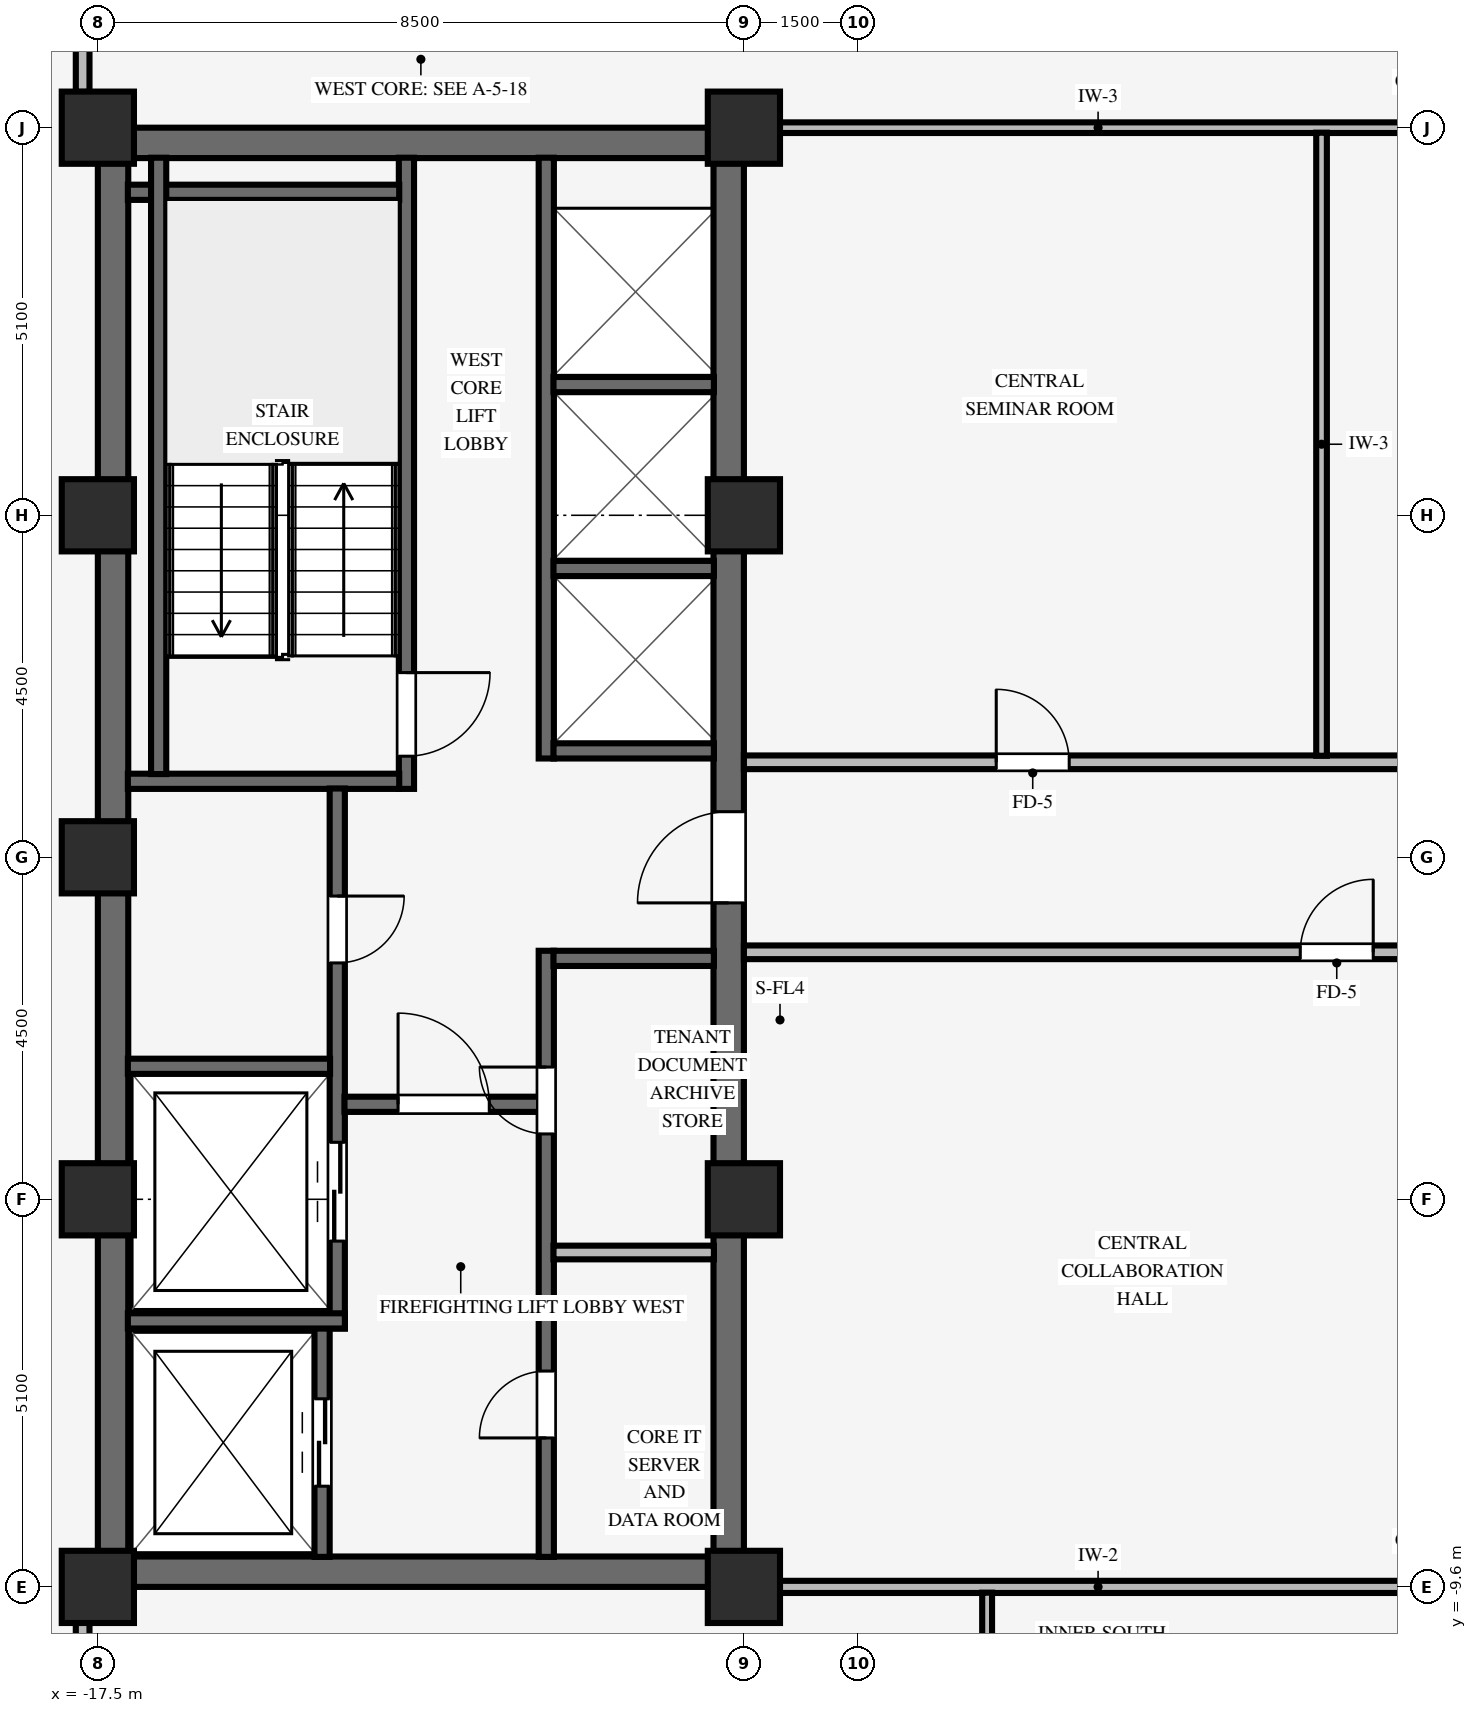
"""IFC4 building model, lengths in metres.
Left out: names, types, materials, properties, quantities, classifications, styles, units other than length and angle.
Written with IfcOpenShell. Run it as: python <this file> out.ifc"""

import sys

from ifc_helpers import new_model, si_unit, direction, frame, frame_2d, origin, origin_2d, place, context, subcontext, project, spatial, rectangle, extrude, source, transform, mapped, element, fill, save


model = new_model("IFC4")
c1 = context("Model", 3, precision=1e-05, world=origin(), true_north=direction((0.0, 1.0)))
c2 = subcontext(c1, "Body", "Model", "MODEL_VIEW")
j1 = project(units=[si_unit("LENGTHUNIT", "METRE"), si_unit("PLANEANGLEUNIT", "RADIAN")], contexts=[c1])
p1 = place(None, origin())
s1 = spatial("IfcSite", under=j1, at=p1, CompositionType="ELEMENT")
p2 = place(p1, origin())
s2 = spatial("IfcBuilding", under=s1, at=p2, CompositionType="ELEMENT")
p3 = place(p2, frame((0.0, 0.0, 178.6)))
s3 = spatial("IfcBuildingStorey", under=s2, at=p3, CompositionType="ELEMENT", Elevation=178.6)
for number, where, z_axis, x_axis in (
    (1, (-17.5, -9.4, 0.0), (0.0, 0.0, 1.0), (1.0, 0.0, 0.0)),
    (2, (-17.5, 9.4, 0.0), (0.0, 0.0, 1.0), (1.0, 0.0, 0.0)),
):
    element("IfcWall", number, at=place(p3, frame(where, z_axis=z_axis, x_axis=x_axis)), inside=s3, PredefinedType="SHEAR", context=c2, shape_type="SweptSolid", body=[
        extrude(rectangle(XDim=8.5, YDim=0.4, at=frame_2d((4.25, 0.0))), origin(), (0.0, 0.0, 1.0), 3.37),
    ])
p4 = place(p3, frame((-17.3, -9.205, 0.0), z_axis=(0.0, 0.0, 1.0), x_axis=(0.0, 1.0, 0.0)))
e3 = element("IfcWall", 3, at=p4, inside=s3, PredefinedType="SHEAR", context=c2, shape_type="SweptSolid", body=[
    extrude(rectangle(XDim=18.41, YDim=0.4, at=frame_2d((9.205, 0.0))), origin(), (0.0, 0.0, 1.0), 3.37),
])
p5 = place(p3, frame((-9.2, -9.205, 0.0), z_axis=(0.0, 0.0, 1.0), x_axis=(0.0, 1.0, 0.0)))
e4 = element("IfcWall", 4, at=p5, inside=s3, PredefinedType="SHEAR", context=c2, shape_type="SweptSolid", body=[
    extrude(rectangle(XDim=18.41, YDim=0.4, at=frame_2d((9.205, 0.0))), origin(), (0.0, 0.0, 1.0), 3.37),
])
p6 = place(p5, frame((8.605, 0.0, 0.0)))
e5 = element("IfcOpeningElement", 5, at=p6, cuts=e4, PredefinedType="OPENING", context=c2, shape_type="SweptSolid", body=[
    extrude(rectangle(XDim=1.2, YDim=2.15, at=frame_2d((0.6, 1.075))), frame((0.0, 0.21, 0.0), z_axis=(0.0, -1.0, 0.0), x_axis=(1.0, 0.0, 0.0)), (0.0, 0.0, 1.0), 0.42),
])
for number, where, z_axis, x_axis in (
    (6, (-17.5, -9.6, 0.0), (0.0, 0.0, 1.0), (1.0, 0.0, 0.0)),
    (7, (-17.5, -4.5, 0.0), (0.0, 0.0, 1.0), (1.0, 0.0, 0.0)),
    (8, (-17.5, 4.5, 0.0), (0.0, 0.0, 1.0), (1.0, 0.0, 0.0)),
    (9, (-17.5, 9.6, 0.0), (0.0, 0.0, 1.0), (1.0, 0.0, 0.0)),
    (10, (-9.0, -9.6, 0.0), (0.0, 0.0, 1.0), (1.0, 0.0, 0.0)),
    (11, (-9.0, -4.5, 0.0), (0.0, 0.0, 1.0), (1.0, 0.0, 0.0)),
    (12, (-9.0, 4.5, 0.0), (0.0, 0.0, 1.0), (1.0, 0.0, 0.0)),
    (13, (-9.0, 9.6, 0.0), (0.0, 0.0, 1.0), (1.0, 0.0, 0.0)),
    (14, (-17.5, 0.0, 0.0), (0.0, 0.0, 1.0), (1.0, 0.0, 0.0)),
):
    element("IfcColumn", number, at=place(p3, frame(where, z_axis=z_axis, x_axis=x_axis)), inside=s3, PredefinedType="COLUMN", context=c2, shape_type="SweptSolid", body=[
        extrude(rectangle(XDim=0.95, YDim=0.95, at=origin_2d()), origin(), (0.0, 0.0, 1.0), 3.37),
    ])
p7 = place(p3, frame((-13.44, 0.9, 0.0), z_axis=(0.0, 0.0, 1.0), x_axis=(0.0, 1.0, 0.0)))
e15 = element("IfcWall", 15, at=p7, inside=s3, PredefinedType="SHEAR", context=c2, shape_type="SweptSolid", body=[
    extrude(rectangle(XDim=8.305, YDim=0.2, at=frame_2d((4.153, 0.0))), origin(), (0.0, 0.0, 1.0), 3.37),
])
p8 = place(p7, frame((1.53, 0.0, 0.0), z_axis=(0.0, 0.0, 1.0), x_axis=(-1.0, 0.0, 0.0)))
e16 = element("IfcOpeningElement", 16, at=p8, cuts=e15, PredefinedType="OPENING", context=c2, shape_type="SweptSolid", body=[
    extrude(rectangle(XDim=1.1, YDim=2.15, at=frame_2d((0.55, 1.075))), frame((0.0, 0.11, 0.0), z_axis=(0.0, -1.0, 0.0), x_axis=(1.0, 0.0, 0.0)), (0.0, 0.0, 1.0), 0.22),
])
for number, where, z_axis, x_axis in (
    (17, (-17.105, 1.0, 0.0), (0.0, 0.0, 1.0), (1.0, 0.0, 0.0)),
    (18, (-17.105, 8.75, 0.0), (0.0, 0.0, 1.0), (1.0, 0.0, 0.0)),
):
    element("IfcWall", number, at=place(p3, frame(where, z_axis=z_axis, x_axis=x_axis)), inside=s3, PredefinedType="SHEAR", context=c2, shape_type="SweptSolid", body=[
        extrude(rectangle(XDim=3.57, YDim=0.2, at=frame_2d((1.785, 0.0))), origin(), (0.0, 0.0, 1.0), 3.37),
    ])
p9 = place(p3, frame((-16.7, 1.095, 0.0), z_axis=(0.0, 0.0, 1.0), x_axis=(0.0, 1.0, 0.0)))
e19 = element("IfcWall", 19, at=p9, inside=s3, PredefinedType="SHEAR", context=c2, shape_type="SweptSolid", body=[
    extrude(rectangle(XDim=8.11, YDim=0.2, at=frame_2d((4.055, 0.0))), origin(), (0.0, 0.0, 1.0), 3.37),
])
p10 = place(p3, frame((-14.55, -9.205, 0.0), z_axis=(0.0, 0.0, 1.0), x_axis=(0.0, 1.0, 0.0)))
e20 = element("IfcWall", 20, at=p10, inside=s3, PredefinedType="SHEAR", context=c2, shape_type="SweptSolid", body=[
    extrude(rectangle(XDim=3.01, YDim=0.2, at=frame_2d((1.505, 0.0))), origin(), (0.0, 0.0, 1.0), 3.37),
])
p11 = place(p10, frame((0.93, 0.0, 0.0)))
e21 = element("IfcOpeningElement", 21, at=p11, cuts=e20, PredefinedType="OPENING", context=c2, shape_type="SweptSolid", body=[
    extrude(rectangle(XDim=1.15, YDim=2.15, at=frame_2d((0.575, 1.075))), frame((0.0, 0.11, 0.0), z_axis=(0.0, -1.0, 0.0), x_axis=(1.0, 0.0, 0.0)), (0.0, 0.0, 1.0), 0.22),
])
p12 = place(p3, frame((-14.35, -6.2, 0.0), z_axis=(0.0, 0.0, 1.0), x_axis=(0.0, 1.0, 0.0)))
e22 = element("IfcWall", 22, at=p12, inside=s3, PredefinedType="SHEAR", context=c2, shape_type="SweptSolid", body=[
    extrude(rectangle(XDim=7.105, YDim=0.2, at=frame_2d((3.552, 0.0))), origin(), (0.0, 0.0, 1.0), 3.37),
])
p13 = place(p12, frame((5.69, 0.0, 0.0), z_axis=(0.0, 0.0, 1.0), x_axis=(-1.0, 0.0, 0.0)))
e23 = element("IfcOpeningElement", 23, at=p13, cuts=e22, PredefinedType="OPENING", context=c2, shape_type="SweptSolid", body=[
    extrude(rectangle(XDim=0.88, YDim=2.1, at=frame_2d((0.44, 1.05))), frame((0.0, 0.11, 0.0), z_axis=(0.0, -1.0, 0.0), x_axis=(1.0, 0.0, 0.0)), (0.0, 0.0, 1.0), 0.22),
])
p14 = place(p12, frame((1.15, 0.0, 0.0)))
e24 = element("IfcOpeningElement", 24, at=p14, cuts=e22, PredefinedType="OPENING", context=c2, shape_type="SweptSolid", body=[
    extrude(rectangle(XDim=1.3, YDim=2.2, at=frame_2d((0.65, 1.1))), frame((0.0, 0.11, 0.0), z_axis=(0.0, -1.0, 0.0), x_axis=(1.0, 0.0, 0.0)), (0.0, 0.0, 1.0), 0.22),
])
p15 = place(p3, frame((-17.105, -6.1, 0.0), z_axis=(0.0, 0.0, 1.0), x_axis=(1.0, 0.0, 0.0)))
e25 = element("IfcWall", 25, at=p15, inside=s3, PredefinedType="SHEAR", context=c2, shape_type="SweptSolid", body=[
    extrude(rectangle(XDim=2.855, YDim=0.2, at=frame_2d((1.427, 0.0))), origin(), (0.0, 0.0, 1.0), 3.37),
])
p16 = place(p3, frame((-17.105, -2.75, 0.0), z_axis=(0.0, 0.0, 1.0), x_axis=(1.0, 0.0, 0.0)))
e26 = element("IfcWall", 26, at=p16, inside=s3, PredefinedType="SHEAR", context=c2, shape_type="SweptSolid", body=[
    extrude(rectangle(XDim=2.66, YDim=0.2, at=frame_2d((1.33, 0.0))), origin(), (0.0, 0.0, 1.0), 3.37),
])
p17 = place(p3, frame((-11.6, -9.205, 0.0), z_axis=(0.0, 0.0, 1.0), x_axis=(0.0, 1.0, 0.0)))
e27 = element("IfcWall", 27, at=p17, inside=s3, PredefinedType="SHEAR", context=c2, shape_type="SweptSolid", body=[
    extrude(rectangle(XDim=7.975, YDim=0.2, at=frame_2d((3.988, 0.0))), origin(), (0.0, 0.0, 1.0), 3.37),
])
p18 = place(p17, frame((1.565, 0.0, 0.0)))
e28 = element("IfcOpeningElement", 28, at=p18, cuts=e27, PredefinedType="OPENING", context=c2, shape_type="SweptSolid", body=[
    extrude(rectangle(XDim=0.88, YDim=2.1, at=frame_2d((0.44, 1.05))), frame((0.0, 0.11, 0.0), z_axis=(0.0, -1.0, 0.0), x_axis=(1.0, 0.0, 0.0)), (0.0, 0.0, 1.0), 0.22),
])
p19 = place(p17, frame((5.565, 0.0, 0.0)))
e29 = element("IfcOpeningElement", 29, at=p19, cuts=e27, PredefinedType="OPENING", context=c2, shape_type="SweptSolid", body=[
    extrude(rectangle(XDim=0.88, YDim=2.1, at=frame_2d((0.44, 1.05))), frame((0.0, 0.11, 0.0), z_axis=(0.0, -1.0, 0.0), x_axis=(1.0, 0.0, 0.0)), (0.0, 0.0, 1.0), 0.22),
])
p20 = place(p3, frame((-14.255, -3.25, 0.0), z_axis=(0.0, 0.0, 1.0), x_axis=(1.0, 0.0, 0.0)))
e30 = element("IfcWall", 30, at=p20, inside=s3, PredefinedType="SHEAR", context=c2, shape_type="SweptSolid", body=[
    extrude(rectangle(XDim=2.56, YDim=0.2, at=frame_2d((1.28, 0.0))), origin(), (0.0, 0.0, 1.0), 3.37),
])
p21 = place(p20, frame((0.705, 0.0, 0.0)))
e31 = element("IfcOpeningElement", 31, at=p21, cuts=e30, PredefinedType="OPENING", context=c2, shape_type="SweptSolid", body=[
    extrude(rectangle(XDim=1.2, YDim=2.15, at=frame_2d((0.6, 1.075))), frame((0.0, 0.11, 0.0), z_axis=(0.0, -1.0, 0.0), x_axis=(1.0, 0.0, 0.0)), (0.0, 0.0, 1.0), 0.22),
])
p22 = place(p3, frame((-11.505, -1.33, 0.0), z_axis=(0.0, 0.0, 1.0), x_axis=(1.0, 0.0, 0.0)))
e32 = element("IfcWall", 32, at=p22, inside=s3, PredefinedType="SHEAR", context=c2, shape_type="SweptSolid", body=[
    extrude(rectangle(XDim=2.11, YDim=0.2, at=frame_2d((1.055, 0.0))), origin(), (0.0, 0.0, 1.0), 3.37),
])
p23 = place(p3, frame((-11.505, -5.2, 0.0), z_axis=(0.0, 0.0, 1.0), x_axis=(1.0, 0.0, 0.0)))
e33 = element("IfcWall", 33, at=p23, inside=s3, PredefinedType="PARTITIONING", context=c2, shape_type="SweptSolid", body=[
    extrude(rectangle(XDim=2.11, YDim=0.18, at=frame_2d((1.055, 0.0))), origin(), (0.0, 0.0, 1.0), 3.36),
])
p24 = place(p3, frame((-11.6, 1.3, 0.0), z_axis=(0.0, 0.0, 1.0), x_axis=(0.0, 1.0, 0.0)))
e34 = element("IfcWall", 34, at=p24, inside=s3, PredefinedType="SHEAR", context=c2, shape_type="SweptSolid", body=[
    extrude(rectangle(XDim=7.905, YDim=0.2, at=frame_2d((3.953, 0.0))), origin(), (0.0, 0.0, 1.0), 3.37),
])
for number, where, z_axis, x_axis in (
    (35, (-11.505, 1.4, 0.0), (0.0, 0.0, 1.0), (1.0, 0.0, 0.0)),
    (36, (-11.505, 3.8, 0.0), (0.0, 0.0, 1.0), (1.0, 0.0, 0.0)),
    (37, (-11.505, 6.22, 0.0), (0.0, 0.0, 1.0), (1.0, 0.0, 0.0)),
):
    element("IfcWall", number, at=place(p3, frame(where, z_axis=z_axis, x_axis=x_axis)), inside=s3, PredefinedType="SHEAR", context=c2, shape_type="SweptSolid", body=[
        extrude(rectangle(XDim=2.11, YDim=0.2, at=frame_2d((1.055, 0.0))), origin(), (0.0, 0.0, 1.0), 3.37),
    ])
p25 = place(p3, frame((-8.529, -9.6, 0.0), z_axis=(0.0, 0.0, 1.0), x_axis=(1.0, 0.0, 0.0)))
e38 = element("IfcWall", 38, at=p25, inside=s3, PredefinedType="PARTITIONING", context=c2, shape_type="SweptSolid", body=[
    extrude(rectangle(XDim=8.378, YDim=0.16, at=frame_2d((4.189, 0.0))), origin(), (0.0, 0.0, 1.0), 2.405),
])
p26 = place(p3, frame((-9.0, -1.25, 0.0), z_axis=(0.0, 0.0, 1.0), x_axis=(1.0, 0.0, 0.0)))
e39 = element("IfcWall", 39, at=p26, inside=s3, PredefinedType="PARTITIONING", context=c2, shape_type="SweptSolid", body=[
    extrude(rectangle(XDim=15.6, YDim=0.18, at=frame_2d((7.8, 0.0))), origin(), (0.0, 0.0, 1.0), 3.36),
])
p27 = place(p26, frame((7.32, 0.0, 0.0)))
e40 = element("IfcOpeningElement", 40, at=p27, cuts=e39, PredefinedType="OPENING", context=c2, shape_type="SweptSolid", body=[
    extrude(rectangle(XDim=0.96, YDim=2.1, at=frame_2d((0.48, 1.05))), frame((0.0, 0.1, 0.0), z_axis=(0.0, -1.0, 0.0), x_axis=(1.0, 0.0, 0.0)), (0.0, 0.0, 1.0), 0.2),
])
p28 = place(p3, frame((-9.0, 1.25, 0.0), z_axis=(0.0, 0.0, 1.0), x_axis=(1.0, 0.0, 0.0)))
e41 = element("IfcWall", 41, at=p28, inside=s3, PredefinedType="PARTITIONING", context=c2, shape_type="SweptSolid", body=[
    extrude(rectangle(XDim=15.6, YDim=0.18, at=frame_2d((7.8, 0.0))), origin(), (0.0, 0.0, 1.0), 3.36),
])
p29 = place(p28, frame((3.32, 0.0, 0.0)))
e42 = element("IfcOpeningElement", 42, at=p29, cuts=e41, PredefinedType="OPENING", context=c2, shape_type="SweptSolid", body=[
    extrude(rectangle(XDim=0.96, YDim=2.1, at=frame_2d((0.48, 1.05))), frame((0.0, 0.1, 0.0), z_axis=(0.0, -1.0, 0.0), x_axis=(1.0, 0.0, 0.0)), (0.0, 0.0, 1.0), 0.2),
])
p30 = place(p3, frame((-8.529, 9.6, 0.0), z_axis=(0.0, 0.0, 1.0), x_axis=(1.0, 0.0, 0.0)))
e43 = element("IfcWall", 43, at=p30, inside=s3, PredefinedType="PARTITIONING", context=c2, shape_type="SweptSolid", body=[
    extrude(rectangle(XDim=8.378, YDim=0.14, at=frame_2d((4.189, 0.0))), origin(), (0.0, 0.0, 1.0), 2.405),
])
for number, where, z_axis, x_axis in (
    (44, (-17.7, -13.414, 0.0), (0.0, 0.0, 1.0), (0.0, 1.0, 0.0)),
    (45, (-17.7, 10.071, 0.0), (0.0, 0.0, 1.0), (0.0, 1.0, 0.0)),
):
    element("IfcWall", number, at=place(p3, frame(where, z_axis=z_axis, x_axis=x_axis)), inside=s3, PredefinedType="PARTITIONING", context=c2, shape_type="SweptSolid", body=[
        extrude(rectangle(XDim=3.343, YDim=0.18, at=frame_2d((1.671, 0.0))), origin(), (0.0, 0.0, 1.0), 2.816),
    ])
p31 = place(p3, frame((-5.8, -13.414, 0.0), z_axis=(0.0, 0.0, 1.0), x_axis=(0.0, 1.0, 0.0)))
e46 = element("IfcWall", 46, at=p31, inside=s3, PredefinedType="PARTITIONING", context=c2, shape_type="SweptSolid", body=[
    extrude(rectangle(XDim=3.738, YDim=0.13, at=frame_2d((1.869, 0.0))), origin(), (0.0, 0.0, 1.0), 3.36),
])
p32 = place(p3, frame((-1.4, 1.336, 0.0), z_axis=(0.0, 0.0, 1.0), x_axis=(0.0, 1.0, 0.0)))
e47 = element("IfcWall", 47, at=p32, inside=s3, PredefinedType="PARTITIONING", context=c2, shape_type="SweptSolid", body=[
    extrude(rectangle(XDim=8.198, YDim=0.14, at=frame_2d((4.099, 0.0))), origin(), (0.0, 0.0, 1.0), 3.36),
])
m1 = source(origin(), c2, "Body", "SweptSolid", [
    extrude(rectangle(XDim=1.1, YDim=2.15, at=frame_2d((0.55, 1.075))), frame((0.0, 0.025, 0.0), z_axis=(0.0, -1.0, 0.0), x_axis=(1.0, 0.0, 0.0)), (0.0, 0.0, 1.0), 0.05),
])
p33 = place(p8, origin())
e48 = element("IfcDoor", 48, at=p33, inside=s3, OperationType="SINGLE_SWING_LEFT", PredefinedType="DOOR", context=c2, shape_type="MappedRepresentation", body=[
    mapped(m1, transform((0.0, 0.0, 0.0), scale=1.0)),
])
fill(e16, e48)
m2 = source(origin(), c2, "Body", "SweptSolid", [
    extrude(rectangle(XDim=0.88, YDim=2.1, at=frame_2d((0.44, 1.05))), frame((0.0, 0.025, 0.0), z_axis=(0.0, -1.0, 0.0), x_axis=(1.0, 0.0, 0.0)), (0.0, 0.0, 1.0), 0.05),
])
p34 = place(p13, origin())
e49 = element("IfcDoor", 49, at=p34, inside=s3, OperationType="SINGLE_SWING_LEFT", PredefinedType="DOOR", context=c2, shape_type="MappedRepresentation", body=[
    mapped(m2, transform((0.0, 0.0, 0.0), scale=1.0)),
])
fill(e23, e49)
m3 = source(origin(), c2, "Body", "SweptSolid", [
    extrude(rectangle(XDim=1.2, YDim=2.15, at=frame_2d((0.6, 1.075))), frame((0.0, 0.025, 0.0), z_axis=(0.0, -1.0, 0.0), x_axis=(1.0, 0.0, 0.0)), (0.0, 0.0, 1.0), 0.05),
])
p35 = place(p21, origin())
e50 = element("IfcDoor", 50, at=p35, inside=s3, OperationType="SINGLE_SWING_LEFT", PredefinedType="DOOR", context=c2, shape_type="MappedRepresentation", body=[
    mapped(m3, transform((0.0, 0.0, 0.0), scale=1.0)),
])
fill(e31, e50)
p36 = place(p18, origin())
e51 = element("IfcDoor", 51, at=p36, inside=s3, OperationType="SINGLE_SWING_LEFT", PredefinedType="DOOR", context=c2, shape_type="MappedRepresentation", body=[
    mapped(m2, transform((0.0, 0.0, 0.0), scale=1.0)),
])
fill(e28, e51)
p37 = place(p19, origin())
e52 = element("IfcDoor", 52, at=p37, inside=s3, OperationType="SINGLE_SWING_RIGHT", PredefinedType="DOOR", context=c2, shape_type="MappedRepresentation", body=[
    mapped(m2, transform((0.0, 0.0, 0.0), scale=1.0)),
])
fill(e29, e52)
p38 = place(p6, origin())
e53 = element("IfcDoor", 53, at=p38, inside=s3, OperationType="SINGLE_SWING_LEFT", PredefinedType="DOOR", context=c2, shape_type="MappedRepresentation", body=[
    mapped(m3, transform((0.0, 0.0, 0.0), scale=1.0)),
])
fill(e5, e53)
m4 = source(origin(), c2, "Body", "SweptSolid", [
    extrude(rectangle(XDim=1.15, YDim=2.15, at=frame_2d((0.575, 1.075))), frame((0.0, 0.025, 0.0), z_axis=(0.0, -1.0, 0.0), x_axis=(1.0, 0.0, 0.0)), (0.0, 0.0, 1.0), 0.05),
])
p39 = place(p11, origin())
e54 = element("IfcDoor", 54, at=p39, inside=s3, OperationType="DOUBLE_DOOR_SLIDING", PredefinedType="DOOR", context=c2, shape_type="MappedRepresentation", body=[
    mapped(m4, transform((0.0, 0.0, 0.0), scale=1.0)),
])
fill(e21, e54)
m5 = source(origin(), c2, "Body", "SweptSolid", [
    extrude(rectangle(XDim=1.3, YDim=2.2, at=frame_2d((0.65, 1.1))), frame((0.0, 0.025, 0.0), z_axis=(0.0, -1.0, 0.0), x_axis=(1.0, 0.0, 0.0)), (0.0, 0.0, 1.0), 0.05),
])
p40 = place(p14, origin())
e55 = element("IfcDoor", 55, at=p40, inside=s3, OperationType="DOUBLE_DOOR_SLIDING", PredefinedType="DOOR", context=c2, shape_type="MappedRepresentation", body=[
    mapped(m5, transform((0.0, 0.0, 0.0), scale=1.0)),
])
fill(e24, e55)
m6 = source(origin(), c2, "Body", "SweptSolid", [
    extrude(rectangle(XDim=0.96, YDim=2.1, at=frame_2d((0.48, 1.05))), frame((0.0, 0.025, 0.0), z_axis=(0.0, -1.0, 0.0), x_axis=(1.0, 0.0, 0.0)), (0.0, 0.0, 1.0), 0.05),
])
p41 = place(p27, origin())
e56 = element("IfcDoor", 56, at=p41, inside=s3, OperationType="SINGLE_SWING_RIGHT", PredefinedType="DOOR", context=c2, shape_type="MappedRepresentation", body=[
    mapped(m6, transform((0.0, 0.0, 0.0), scale=1.0)),
])
fill(e40, e56)
p42 = place(p29, origin())
e57 = element("IfcDoor", 57, at=p42, inside=s3, OperationType="SINGLE_SWING_LEFT", PredefinedType="DOOR", context=c2, shape_type="MappedRepresentation", body=[
    mapped(m6, transform((0.0, 0.0, 0.0), scale=1.0)),
])
fill(e42, e57)
save(model, sys.argv[1])
